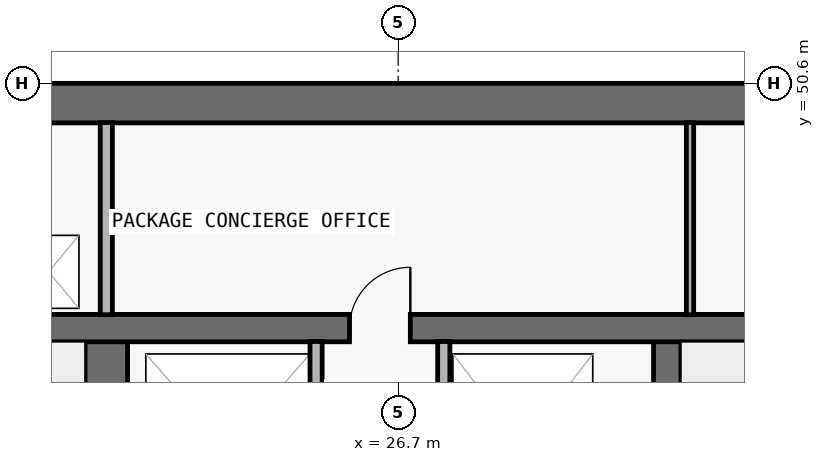
"""IFC4 building model, lengths in metres.
Left out: names, types, materials, properties, quantities, classifications, styles, units other than length and angle.
Written with IfcOpenShell. Run it as: python <this file> out.ifc"""

import sys

from ifc_helpers import new_model, si_unit, direction, frame, frame_2d, origin, place, context, subcontext, project, spatial, rectangle, extrude, element, fill, save


model = new_model("IFC4")
c1 = context("Model", 3, precision=1e-05, world=origin(), true_north=direction((0.0, 1.0)))
c2 = subcontext(c1, "Body", "Model", "MODEL_VIEW")
j1 = project(units=[si_unit("LENGTHUNIT", "METRE"), si_unit("PLANEANGLEUNIT", "RADIAN")], contexts=[c1])
p1 = place(None, origin())
s1 = spatial("IfcSite", under=j1, at=p1, CompositionType="ELEMENT")
p2 = place(p1, origin())
s2 = spatial("IfcBuilding", under=s1, at=p2, CompositionType="ELEMENT")
p3 = place(p2, frame((0.0, 0.0, 138.9)))
s3 = spatial("IfcBuildingStorey", under=s2, at=p3, CompositionType="ELEMENT", Elevation=138.9)
p4 = place(p3, frame((17.85, 50.275, 0.0), z_axis=(0.0, 0.0, 1.0), x_axis=(1.0, 0.0, 0.0)))
e1 = element("IfcWall", 1, at=p4, inside=s3, PredefinedType="SHEAR", context=c2, shape_type="SweptSolid", body=[
    extrude(rectangle(XDim=42.1, YDim=0.65, at=frame_2d((21.05, 0.0))), origin(), (0.0, 0.0, 1.0), 3.05),
])
p5 = place(p3, frame((21.9, 36.95, 0.0), z_axis=(0.0, 0.0, 1.0), x_axis=(0.0, 1.0, 0.0)))
e2 = element("IfcWall", 2, at=p5, inside=s3, PredefinedType="SHEAR", context=c2, shape_type="SweptSolid", body=[
    extrude(rectangle(XDim=9.625, YDim=0.7, at=frame_2d((4.812, 0.0))), origin(), (0.0, 0.0, 1.0), 3.05),
])
p6 = place(p5, frame((0.6, 0.0, 0.0)))
e3 = element("IfcOpeningElement", 3, at=p6, cuts=e2, PredefinedType="OPENING", context=c2, shape_type="SweptSolid", body=[
    extrude(rectangle(XDim=1.1, YDim=2.15, at=frame_2d((0.55, 1.075))), frame((0.0, 0.36, 0.0), z_axis=(0.0, -1.0, 0.0), x_axis=(1.0, 0.0, 0.0)), (0.0, 0.0, 1.0), 0.72),
])
p7 = place(p3, frame((31.125, 36.95, 0.0), z_axis=(0.0, 0.0, 1.0), x_axis=(0.0, 1.0, 0.0)))
e4 = element("IfcWall", 4, at=p7, inside=s3, PredefinedType="SHEAR", context=c2, shape_type="SweptSolid", body=[
    extrude(rectangle(XDim=9.625, YDim=0.45, at=frame_2d((4.812, 0.0))), origin(), (0.0, 0.0, 1.0), 3.05),
])
p8 = place(p3, frame((18.25, 46.575, 0.0), z_axis=(0.0, 0.0, 1.0), x_axis=(1.0, 0.0, 0.0)))
e5 = element("IfcWall", 5, at=p8, inside=s3, PredefinedType="SHEAR", context=c2, shape_type="SweptSolid", body=[
    extrude(rectangle(XDim=41.3, YDim=0.45, at=frame_2d((20.65, 0.0))), origin(), (0.0, 0.0, 1.0), 3.05),
])
p9 = place(p8, frame((7.65, 0.0, 0.0)))
e6 = element("IfcOpeningElement", 6, at=p9, cuts=e5, PredefinedType="OPENING", context=c2, shape_type="SweptSolid", body=[
    extrude(rectangle(XDim=1.0, YDim=2.2, at=frame_2d((0.5, 1.1))), frame((0.0, 0.235, 0.0), z_axis=(0.0, -1.0, 0.0), x_axis=(1.0, 0.0, 0.0)), (0.0, 0.0, 1.0), 0.47),
])
p10 = place(p8, frame((32.675, 0.0, 0.0)))
e7 = element("IfcOpeningElement", 7, at=p10, cuts=e5, PredefinedType="OPENING", context=c2, shape_type="SweptSolid", body=[
    extrude(rectangle(XDim=1.05, YDim=2.15, at=frame_2d((0.525, 1.075))), frame((0.0, 0.235, 0.0), z_axis=(0.0, -1.0, 0.0), x_axis=(1.0, 0.0, 0.0)), (0.0, 0.0, 1.0), 0.47),
])
p11 = place(p3, frame((21.9, 46.795, 0.0), z_axis=(0.0, 0.0, 1.0), x_axis=(0.0, 1.0, 0.0)))
e8 = element("IfcWall", 8, at=p11, inside=s3, PredefinedType="PARTITIONING", context=c2, shape_type="SweptSolid", body=[
    extrude(rectangle(XDim=3.16, YDim=0.2, at=frame_2d((1.58, 0.0))), origin(), (0.0, 0.0, 1.0), 3.05),
])
for number, where, z_axis, x_axis in (
    (9, (25.35, 43.17, 0.0), (0.0, 0.0, 1.0), (0.0, 1.0, 0.0)),
    (10, (27.45, 43.17, 0.0), (0.0, 0.0, 1.0), (0.0, 1.0, 0.0)),
):
    element("IfcWall", number, at=place(p3, frame(where, z_axis=z_axis, x_axis=x_axis)), inside=s3, PredefinedType="PARTITIONING", context=c2, shape_type="SweptSolid", body=[
        extrude(rectangle(XDim=3.185, YDim=0.2, at=frame_2d((1.593, 0.0))), origin(), (0.0, 0.0, 1.0), 3.05),
    ])
p12 = place(p3, frame((31.5, 46.795, 0.0), z_axis=(0.0, 0.0, 1.0), x_axis=(0.0, 1.0, 0.0)))
e11 = element("IfcWall", 11, at=p12, inside=s3, PredefinedType="PARTITIONING", context=c2, shape_type="SweptSolid", body=[
    extrude(rectangle(XDim=3.16, YDim=0.12, at=frame_2d((1.58, 0.0))), origin(), (0.0, 0.0, 1.0), 3.05),
])
p13 = place(p9, origin())
e12 = element("IfcDoor", 12, at=p13, inside=s3, OperationType="SINGLE_SWING_RIGHT", PredefinedType="DOOR", context=c2, shape_type="SweptSolid", body=[
    extrude(rectangle(XDim=1.0, YDim=2.2, at=frame_2d((0.5, 1.1))), frame((0.0, 0.025, 0.0), z_axis=(0.0, -1.0, 0.0), x_axis=(1.0, 0.0, 0.0)), (0.0, 0.0, 1.0), 0.05),
])
fill(e6, e12)
save(model, sys.argv[1])
